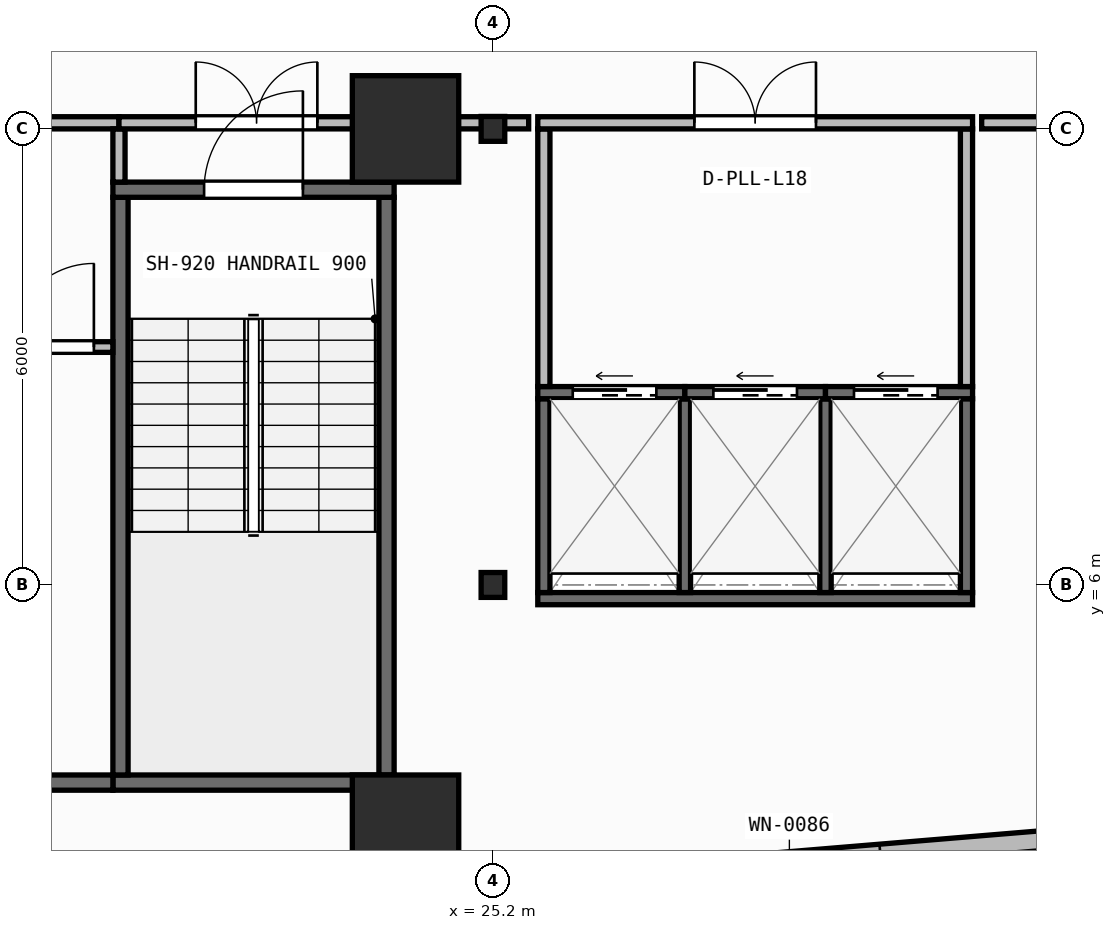
"""IFC4 building model, lengths in metres.
Left out: names, types, materials, properties, quantities, classifications, styles, units other than length and angle.
Written with IfcOpenShell. Run it as: python <this file> out.ifc"""

import sys

from ifc_helpers import new_model, si_unit, direction, frame, frame_2d, origin, origin_2d, place, context, subcontext, project, spatial, rectangle, i_section, extrude, element, fill, save


model = new_model("IFC4")
c1 = context("Model", 3, precision=1e-05, world=origin(), true_north=direction((0.0, 1.0)))
c2 = subcontext(c1, "Body", "Model", "MODEL_VIEW")
j1 = project(units=[si_unit("LENGTHUNIT", "METRE"), si_unit("PLANEANGLEUNIT", "RADIAN")], contexts=[c1])
p1 = place(None, origin())
s1 = spatial("IfcSite", under=j1, at=p1, CompositionType="ELEMENT")
p2 = place(p1, origin())
s2 = spatial("IfcBuilding", under=s1, at=p2, CompositionType="ELEMENT")
p3 = place(p2, frame((0.0, 0.0, 73.85)))
s3 = spatial("IfcBuildingStorey", under=s2, at=p3, CompositionType="ELEMENT", Elevation=73.85)
p4 = place(p3, frame((24.05, 2.8, 0.0), z_axis=(0.0, 0.0, 1.0), x_axis=(1.0, 0.0, 0.0)))
e1 = element("IfcColumn", 1, at=p4, inside=s3, PredefinedType="COLUMN", context=c2, shape_type="SweptSolid", body=[
    extrude(rectangle(XDim=1.4, YDim=1.4, at=origin_2d()), origin(), (0.0, 0.0, 1.0), 3.95),
])
p5 = place(p3, frame((25.2, 6.0, 0.0), z_axis=(0.0, 0.0, 1.0), x_axis=(1.0, 0.0, 0.0)))
e2 = element("IfcColumn", 2, at=p5, inside=s3, PredefinedType="COLUMN", context=c2, shape_type="SweptSolid", body=[
    extrude(i_section(OverallWidth=0.311, OverallDepth=0.327, WebThickness=0.016, FlangeThickness=0.025, FilletRadius=0.017, at=origin_2d()), origin(), (0.0, 0.0, 1.0), 3.95),
])
p6 = place(p3, frame((24.05, 12.0, 0.0), z_axis=(0.0, 0.0, 1.0), x_axis=(1.0, 0.0, 0.0)))
e3 = element("IfcColumn", 3, at=p6, inside=s3, PredefinedType="COLUMN", context=c2, shape_type="SweptSolid", body=[
    extrude(rectangle(XDim=1.4, YDim=1.4, at=origin_2d()), origin(), (0.0, 0.0, 1.0), 3.95),
])
p7 = place(p3, frame((25.2, 12.0, 0.0), z_axis=(0.0, 0.0, 1.0), x_axis=(1.0, 0.0, 0.0)))
e4 = element("IfcColumn", 4, at=p7, inside=s3, PredefinedType="COLUMN", context=c2, shape_type="SweptSolid", body=[
    extrude(i_section(OverallWidth=0.311, OverallDepth=0.327, WebThickness=0.016, FlangeThickness=0.025, FilletRadius=0.017, at=origin_2d()), origin(), (0.0, 0.0, 1.0), 3.95),
])
p8 = place(p3, frame((2.76, 0.174, 0.0), z_axis=(0.0, 0.0, 1.0), x_axis=(0.996571478456, 0.082736257641, 0.0)))
e5 = element("IfcWall", 5, at=p8, inside=s3, PredefinedType="STANDARD", context=c2, shape_type="SweptSolid", body=[
    extrude(rectangle(XDim=52.861, YDim=0.26, at=frame_2d((26.431, 0.0))), origin(), (0.0, 0.0, 1.0), 3.71),
])
p9 = place(p8, frame((25.231, 0.0, 0.9)))
e6 = element("IfcOpeningElement", 6, at=p9, cuts=e5, PredefinedType="OPENING", context=c2, shape_type="SweptSolid", body=[
    extrude(rectangle(XDim=2.4, YDim=1.65, at=frame_2d((1.2, 0.825))), frame((0.0, 0.14, 0.0), z_axis=(0.0, -1.0, 0.0), x_axis=(1.0, 0.0, 0.0)), (0.0, 0.0, 1.0), 0.28),
])
p10 = place(p3, frame((20.2, 3.4, 0.0), z_axis=(0.0, 0.0, 1.0), x_axis=(1.0, 0.0, 0.0)))
e7 = element("IfcWall", 7, at=p10, inside=s3, PredefinedType="SHEAR", context=c2, shape_type="SweptSolid", body=[
    extrude(rectangle(XDim=3.7, YDim=0.2, at=frame_2d((1.85, 0.0))), origin(), (0.0, 0.0, 1.0), 3.71),
])
for number, where, z_axis, x_axis in (
    (8, (20.3, 3.5, 0.0), (0.0, 0.0, 1.0), (0.0, 1.0, 0.0)),
    (9, (23.8, 3.5, 0.0), (0.0, 0.0, 1.0), (0.0, 1.0, 0.0)),
):
    element("IfcWall", number, at=place(p3, frame(where, z_axis=z_axis, x_axis=x_axis)), inside=s3, PredefinedType="SHEAR", context=c2, shape_type="SweptSolid", body=[
        extrude(rectangle(XDim=7.6, YDim=0.2, at=frame_2d((3.8, 0.0))), origin(), (0.0, 0.0, 1.0), 3.71),
    ])
p11 = place(p3, frame((20.2, 11.2, 0.0), z_axis=(0.0, 0.0, 1.0), x_axis=(1.0, 0.0, 0.0)))
e10 = element("IfcWall", 10, at=p11, inside=s3, PredefinedType="SHEAR", context=c2, shape_type="SweptSolid", body=[
    extrude(rectangle(XDim=3.7, YDim=0.2, at=frame_2d((1.85, 0.0))), origin(), (0.0, 0.0, 1.0), 3.71),
])
p12 = place(p11, frame((1.2, 0.0, 0.0)))
e11 = element("IfcOpeningElement", 11, at=p12, cuts=e10, PredefinedType="OPENING", context=c2, shape_type="SweptSolid", body=[
    extrude(rectangle(XDim=1.3, YDim=2.15, at=frame_2d((0.65, 1.075))), frame((0.0, 0.11, 0.0), z_axis=(0.0, -1.0, 0.0), x_axis=(1.0, 0.0, 0.0)), (0.0, 0.0, 1.0), 0.22),
])
p13 = place(p3, frame((6.5, 3.4, 0.0), z_axis=(0.0, 0.0, 1.0), x_axis=(1.0, 0.0, 0.0)))
e12 = element("IfcWall", 12, at=p13, inside=s3, PredefinedType="SHEAR", context=c2, shape_type="SweptSolid", body=[
    extrude(rectangle(XDim=13.7, YDim=0.2, at=frame_2d((6.85, 0.0))), origin(), (0.0, 0.0, 1.0), 3.71),
])
p14 = place(p3, frame((25.79, 5.82, 0.0), z_axis=(0.0, 0.0, 1.0), x_axis=(1.0, 0.0, 0.0)))
e13 = element("IfcWall", 13, at=p14, inside=s3, PredefinedType="SHEAR", context=c2, shape_type="SweptSolid", body=[
    extrude(rectangle(XDim=5.72, YDim=0.16, at=frame_2d((2.86, 0.0))), origin(), (0.0, 0.0, 1.0), 3.71),
])
for number, where, z_axis, x_axis in (
    (14, (25.87, 5.9, 0.0), (0.0, 0.0, 1.0), (0.0, 1.0, 0.0)),
    (15, (31.43, 5.9, 0.0), (0.0, 0.0, 1.0), (0.0, 1.0, 0.0)),
):
    element("IfcWall", number, at=place(p3, frame(where, z_axis=z_axis, x_axis=x_axis)), inside=s3, PredefinedType="SHEAR", context=c2, shape_type="SweptSolid", body=[
        extrude(rectangle(XDim=2.55, YDim=0.16, at=frame_2d((1.275, 0.0))), origin(), (0.0, 0.0, 1.0), 3.71),
    ])
for number, where, z_axis, x_axis in (
    (16, (27.725, 5.9, 0.0), (0.0, 0.0, 1.0), (0.0, 1.0, 0.0)),
    (17, (29.575, 5.9, 0.0), (0.0, 0.0, 1.0), (0.0, 1.0, 0.0)),
):
    element("IfcWall", number, at=place(p3, frame(where, z_axis=z_axis, x_axis=x_axis)), inside=s3, PredefinedType="SHEAR", context=c2, shape_type="SweptSolid", body=[
        extrude(rectangle(XDim=2.55, YDim=0.15, at=frame_2d((1.275, 0.0))), origin(), (0.0, 0.0, 1.0), 3.71),
    ])
p15 = place(p3, frame((25.79, 8.53, 0.0), z_axis=(0.0, 0.0, 1.0), x_axis=(1.0, 0.0, 0.0)))
e18 = element("IfcWall", 18, at=p15, inside=s3, PredefinedType="SHEAR", context=c2, shape_type="SweptSolid", body=[
    extrude(rectangle(XDim=1.935, YDim=0.16, at=frame_2d((0.968, 0.0))), origin(), (0.0, 0.0, 1.0), 3.71),
])
p16 = place(p15, frame((0.46, 0.0, 0.0)))
e19 = element("IfcOpeningElement", 19, at=p16, cuts=e18, PredefinedType="OPENING", context=c2, shape_type="SweptSolid", body=[
    extrude(rectangle(XDim=1.1, YDim=2.15, at=frame_2d((0.55, 1.075))), frame((0.0, 0.09, 0.0), z_axis=(0.0, -1.0, 0.0), x_axis=(1.0, 0.0, 0.0)), (0.0, 0.0, 1.0), 0.18),
])
p17 = place(p3, frame((27.725, 8.53, 0.0), z_axis=(0.0, 0.0, 1.0), x_axis=(1.0, 0.0, 0.0)))
e20 = element("IfcWall", 20, at=p17, inside=s3, PredefinedType="SHEAR", context=c2, shape_type="SweptSolid", body=[
    extrude(rectangle(XDim=1.85, YDim=0.16, at=frame_2d((0.925, 0.0))), origin(), (0.0, 0.0, 1.0), 3.71),
])
p18 = place(p17, frame((0.375, 0.0, 0.0)))
e21 = element("IfcOpeningElement", 21, at=p18, cuts=e20, PredefinedType="OPENING", context=c2, shape_type="SweptSolid", body=[
    extrude(rectangle(XDim=1.1, YDim=2.15, at=frame_2d((0.55, 1.075))), frame((0.0, 0.09, 0.0), z_axis=(0.0, -1.0, 0.0), x_axis=(1.0, 0.0, 0.0)), (0.0, 0.0, 1.0), 0.18),
])
p19 = place(p3, frame((29.575, 8.53, 0.0), z_axis=(0.0, 0.0, 1.0), x_axis=(1.0, 0.0, 0.0)))
e22 = element("IfcWall", 22, at=p19, inside=s3, PredefinedType="SHEAR", context=c2, shape_type="SweptSolid", body=[
    extrude(rectangle(XDim=1.935, YDim=0.16, at=frame_2d((0.968, 0.0))), origin(), (0.0, 0.0, 1.0), 3.71),
])
p20 = place(p19, frame((0.375, 0.0, 0.0)))
e23 = element("IfcOpeningElement", 23, at=p20, cuts=e22, PredefinedType="OPENING", context=c2, shape_type="SweptSolid", body=[
    extrude(rectangle(XDim=1.1, YDim=2.15, at=frame_2d((0.55, 1.075))), frame((0.0, 0.09, 0.0), z_axis=(0.0, -1.0, 0.0), x_axis=(1.0, 0.0, 0.0)), (0.0, 0.0, 1.0), 0.18),
])
p21 = place(p3, frame((18.61, 9.13, 0.0), z_axis=(0.0, 0.0, 1.0), x_axis=(1.0, 0.0, 0.0)))
e24 = element("IfcWall", 24, at=p21, inside=s3, PredefinedType="PARTITIONING", context=c2, shape_type="SweptSolid", body=[
    extrude(rectangle(XDim=1.59, YDim=0.14, at=frame_2d((0.795, 0.0))), origin(), (0.0, 0.0, 1.0), 3.71),
])
p22 = place(p21, frame((0.24, 0.0, 0.0)))
e25 = element("IfcOpeningElement", 25, at=p22, cuts=e24, PredefinedType="OPENING", context=c2, shape_type="SweptSolid", body=[
    extrude(rectangle(XDim=1.1, YDim=2.1, at=frame_2d((0.55, 1.05))), frame((0.0, 0.08, 0.0), z_axis=(0.0, -1.0, 0.0), x_axis=(1.0, 0.0, 0.0)), (0.0, 0.0, 1.0), 0.16),
])
p23 = place(p3, frame((12.58, 12.08, 0.0), z_axis=(0.0, 0.0, 1.0), x_axis=(1.0, 0.0, 0.0)))
e26 = element("IfcWall", 26, at=p23, inside=s3, PredefinedType="PARTITIONING", context=c2, shape_type="SweptSolid", body=[
    extrude(rectangle(XDim=7.7, YDim=0.16, at=frame_2d((3.85, 0.0))), origin(), (0.0, 0.0, 1.0), 3.073),
])
p24 = place(p23, frame((3.05, 0.0, 0.0)))
e27 = element("IfcOpeningElement", 27, at=p24, cuts=e26, PredefinedType="OPENING", context=c2, shape_type="SweptSolid", body=[
    extrude(rectangle(XDim=1.6, YDim=2.05, at=frame_2d((0.8, 1.025))), frame((0.0, 0.09, 0.0), z_axis=(0.0, -1.0, 0.0), x_axis=(1.0, 0.0, 0.0)), (0.0, 0.0, 1.0), 0.18),
])
p25 = place(p3, frame((20.28, 11.3, 0.0), z_axis=(0.0, 0.0, 1.0), x_axis=(0.0, 1.0, 0.0)))
e28 = element("IfcWall", 28, at=p25, inside=s3, PredefinedType="PARTITIONING", context=c2, shape_type="SweptSolid", body=[
    extrude(rectangle(XDim=0.7, YDim=0.16, at=frame_2d((0.35, 0.0))), origin(), (0.0, 0.0, 1.0), 3.71),
])
p26 = place(p3, frame((20.28, 12.08, 0.0), z_axis=(0.0, 0.0, 1.0), x_axis=(1.0, 0.0, 0.0)))
e29 = element("IfcWall", 29, at=p26, inside=s3, PredefinedType="PARTITIONING", context=c2, shape_type="SweptSolid", body=[
    extrude(rectangle(XDim=3.62, YDim=0.16, at=frame_2d((1.81, 0.0))), origin(), (0.0, 0.0, 1.0), 3.073),
])
p27 = place(p26, frame((1.01, 0.0, 0.0)))
e30 = element("IfcOpeningElement", 30, at=p27, cuts=e29, PredefinedType="OPENING", context=c2, shape_type="SweptSolid", body=[
    extrude(rectangle(XDim=1.6, YDim=2.05, at=frame_2d((0.8, 1.025))), frame((0.0, 0.09, 0.0), z_axis=(0.0, -1.0, 0.0), x_axis=(1.0, 0.0, 0.0)), (0.0, 0.0, 1.0), 0.18),
])
p28 = place(p3, frame((23.82, 11.3, 0.0), z_axis=(0.0, 0.0, 1.0), x_axis=(0.0, 1.0, 0.0)))
e31 = element("IfcWall", 31, at=p28, inside=s3, PredefinedType="PARTITIONING", context=c2, shape_type="SweptSolid", body=[
    extrude(rectangle(XDim=0.7, YDim=0.16, at=frame_2d((0.35, 0.0))), origin(), (0.0, 0.0, 1.0), 3.71),
])
for number, where, z_axis, x_axis in (
    (32, (25.87, 8.61, 0.0), (0.0, 0.0, 1.0), (0.0, 1.0, 0.0)),
    (33, (31.43, 8.61, 0.0), (0.0, 0.0, 1.0), (0.0, 1.0, 0.0)),
):
    element("IfcWall", number, at=place(p3, frame(where, z_axis=z_axis, x_axis=x_axis)), inside=s3, PredefinedType="PARTITIONING", context=c2, shape_type="SweptSolid", body=[
        extrude(rectangle(XDim=3.39, YDim=0.16, at=frame_2d((1.695, 0.0))), origin(), (0.0, 0.0, 1.0), 3.71),
    ])
p29 = place(p3, frame((25.79, 12.08, 0.0), z_axis=(0.0, 0.0, 1.0), x_axis=(1.0, 0.0, 0.0)))
e34 = element("IfcWall", 34, at=p29, inside=s3, PredefinedType="PARTITIONING", context=c2, shape_type="SweptSolid", body=[
    extrude(rectangle(XDim=5.72, YDim=0.16, at=frame_2d((2.86, 0.0))), origin(), (0.0, 0.0, 1.0), 3.073),
])
p30 = place(p29, frame((2.06, 0.0, 0.0)))
e35 = element("IfcOpeningElement", 35, at=p30, cuts=e34, PredefinedType="OPENING", context=c2, shape_type="SweptSolid", body=[
    extrude(rectangle(XDim=1.6, YDim=2.05, at=frame_2d((0.8, 1.025))), frame((0.0, 0.09, 0.0), z_axis=(0.0, -1.0, 0.0), x_axis=(1.0, 0.0, 0.0)), (0.0, 0.0, 1.0), 0.18),
])
p31 = place(p3, frame((24.02, 12.08, 0.0), z_axis=(0.0, 0.0, 1.0), x_axis=(1.0, 0.0, 0.0)))
e36 = element("IfcWall", 36, at=p31, inside=s3, PredefinedType="PARTITIONING", context=c2, shape_type="SweptSolid", body=[
    extrude(rectangle(XDim=1.65, YDim=0.16, at=frame_2d((0.825, 0.0))), origin(), (0.0, 0.0, 1.0), 3.073),
])
p32 = place(p3, frame((31.63, 12.08, 0.0), z_axis=(0.0, 0.0, 1.0), x_axis=(1.0, 0.0, 0.0)))
e37 = element("IfcWall", 37, at=p32, inside=s3, PredefinedType="PARTITIONING", context=c2, shape_type="SweptSolid", body=[
    extrude(rectangle(XDim=11.181, YDim=0.16, at=frame_2d((5.59, 0.0))), origin(), (0.0, 0.0, 1.0), 3.073),
])
p33 = place(p12, origin())
e38 = element("IfcDoor", 38, at=p33, inside=s3, OperationType="SINGLE_SWING_RIGHT", PredefinedType="DOOR", context=c2, shape_type="SweptSolid", body=[
    extrude(rectangle(XDim=1.3, YDim=2.15, at=frame_2d((0.65, 1.075))), frame((0.0, 0.025, 0.0), z_axis=(0.0, -1.0, 0.0), x_axis=(1.0, 0.0, 0.0)), (0.0, 0.0, 1.0), 0.05),
])
fill(e11, e38)
p34 = place(p16, origin())
e39 = element("IfcDoor", 39, at=p34, inside=s3, OperationType="SLIDING_TO_LEFT", PredefinedType="DOOR", context=c2, shape_type="SweptSolid", body=[
    extrude(rectangle(XDim=1.1, YDim=2.15, at=frame_2d((0.55, 1.075))), frame((0.0, 0.025, 0.0), z_axis=(0.0, -1.0, 0.0), x_axis=(1.0, 0.0, 0.0)), (0.0, 0.0, 1.0), 0.05),
])
fill(e19, e39)
p35 = place(p18, origin())
e40 = element("IfcDoor", 40, at=p35, inside=s3, OperationType="SLIDING_TO_LEFT", PredefinedType="DOOR", context=c2, shape_type="SweptSolid", body=[
    extrude(rectangle(XDim=1.1, YDim=2.15, at=frame_2d((0.55, 1.075))), frame((0.0, 0.025, 0.0), z_axis=(0.0, -1.0, 0.0), x_axis=(1.0, 0.0, 0.0)), (0.0, 0.0, 1.0), 0.05),
])
fill(e21, e40)
p36 = place(p20, origin())
e41 = element("IfcDoor", 41, at=p36, inside=s3, OperationType="SLIDING_TO_LEFT", PredefinedType="DOOR", context=c2, shape_type="SweptSolid", body=[
    extrude(rectangle(XDim=1.1, YDim=2.15, at=frame_2d((0.55, 1.075))), frame((0.0, 0.025, 0.0), z_axis=(0.0, -1.0, 0.0), x_axis=(1.0, 0.0, 0.0)), (0.0, 0.0, 1.0), 0.05),
])
fill(e23, e41)
p37 = place(p22, origin())
e42 = element("IfcDoor", 42, at=p37, inside=s3, OperationType="SINGLE_SWING_RIGHT", PredefinedType="DOOR", context=c2, shape_type="SweptSolid", body=[
    extrude(rectangle(XDim=1.1, YDim=2.1, at=frame_2d((0.55, 1.05))), frame((0.0, 0.025, 0.0), z_axis=(0.0, -1.0, 0.0), x_axis=(1.0, 0.0, 0.0)), (0.0, 0.0, 1.0), 0.05),
])
fill(e25, e42)
p38 = place(p27, origin())
e43 = element("IfcDoor", 43, at=p38, inside=s3, OperationType="DOUBLE_DOOR_SINGLE_SWING", PredefinedType="DOOR", context=c2, shape_type="SweptSolid", body=[
    extrude(rectangle(XDim=1.6, YDim=2.05, at=frame_2d((0.8, 1.025))), frame((0.0, 0.025, 0.0), z_axis=(0.0, -1.0, 0.0), x_axis=(1.0, 0.0, 0.0)), (0.0, 0.0, 1.0), 0.05),
])
fill(e30, e43)
p39 = place(p30, origin())
e44 = element("IfcDoor", 44, at=p39, inside=s3, OperationType="DOUBLE_DOOR_SINGLE_SWING", PredefinedType="DOOR", context=c2, shape_type="SweptSolid", body=[
    extrude(rectangle(XDim=1.6, YDim=2.05, at=frame_2d((0.8, 1.025))), frame((0.0, 0.025, 0.0), z_axis=(0.0, -1.0, 0.0), x_axis=(1.0, 0.0, 0.0)), (0.0, 0.0, 1.0), 0.05),
])
fill(e35, e44)
save(model, sys.argv[1])
